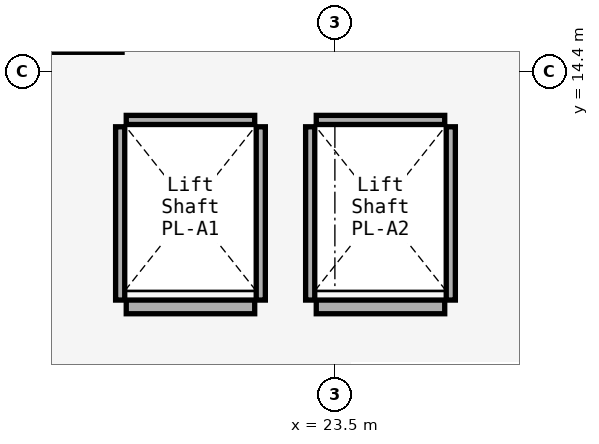
"""IFC4 building model, lengths in metres.
Left out: names, types, materials, properties, quantities, classifications, styles, units other than length and angle.
Written with IfcOpenShell. Run it as: python <this file> out.ifc"""

import sys

from ifc_helpers import new_model, si_unit, direction, frame, frame_2d, origin, place, context, subcontext, project, spatial, rectangle, extrude, element, save


model = new_model("IFC4")
c1 = context("Model", 3, precision=1e-05, world=origin(), true_north=direction((0.0, 1.0)))
c2 = subcontext(c1, "Body", "Model", "MODEL_VIEW")
j1 = project(units=[si_unit("LENGTHUNIT", "METRE"), si_unit("PLANEANGLEUNIT", "RADIAN")], contexts=[c1])
p1 = place(None, origin())
s1 = spatial("IfcSite", under=j1, at=p1, CompositionType="ELEMENT")
p2 = place(p1, origin())
s2 = spatial("IfcBuilding", under=s1, at=p2, CompositionType="ELEMENT")
p3 = place(p2, frame((0.0, 0.0, 24.0)))
s3 = spatial("IfcBuildingStorey", under=s2, at=p3, CompositionType="ELEMENT", Elevation=24.0)
p4 = place(p3, frame((20.755, 11.3, 0.0), z_axis=(0.0, 0.0, 1.0), x_axis=(1.0, 0.0, 0.0)))
e1 = element("IfcWall", 1, at=p4, inside=s3, PredefinedType="SOLIDWALL", context=c2, shape_type="SweptSolid", body=[
    extrude(rectangle(XDim=1.69, YDim=0.18, at=frame_2d((0.845, 0.0))), origin(), (0.0, 0.0, 1.0), 4.17),
])
p5 = place(p3, frame((20.755, 13.76, 0.0), z_axis=(0.0, 0.0, 1.0), x_axis=(1.0, 0.0, 0.0)))
e2 = element("IfcWall", 2, at=p5, inside=s3, PredefinedType="SOLIDWALL", context=c2, shape_type="SweptSolid", body=[
    extrude(rectangle(XDim=1.69, YDim=0.12, at=frame_2d((0.845, 0.0))), origin(), (0.0, 0.0, 1.0), 4.17),
])
for number, where, z_axis, x_axis in (
    (3, (20.675, 11.39, 0.0), (0.0, 0.0, 1.0), (0.0, 1.0, 0.0)),
    (4, (22.525, 11.39, 0.0), (0.0, 0.0, 1.0), (0.0, 1.0, 0.0)),
):
    element("IfcWall", number, at=place(p3, frame(where, z_axis=z_axis, x_axis=x_axis)), inside=s3, PredefinedType="SOLIDWALL", context=c2, shape_type="SweptSolid", body=[
        extrude(rectangle(XDim=2.28, YDim=0.12, at=frame_2d((1.14, 0.0))), origin(), (0.0, 0.0, 1.0), 4.17),
    ])
p6 = place(p3, frame((23.255, 11.3, 0.0), z_axis=(0.0, 0.0, 1.0), x_axis=(1.0, 0.0, 0.0)))
e5 = element("IfcWall", 5, at=p6, inside=s3, PredefinedType="SOLIDWALL", context=c2, shape_type="SweptSolid", body=[
    extrude(rectangle(XDim=1.69, YDim=0.18, at=frame_2d((0.845, 0.0))), origin(), (0.0, 0.0, 1.0), 4.17),
])
p7 = place(p3, frame((23.255, 13.76, 0.0), z_axis=(0.0, 0.0, 1.0), x_axis=(1.0, 0.0, 0.0)))
e6 = element("IfcWall", 6, at=p7, inside=s3, PredefinedType="SOLIDWALL", context=c2, shape_type="SweptSolid", body=[
    extrude(rectangle(XDim=1.69, YDim=0.12, at=frame_2d((0.845, 0.0))), origin(), (0.0, 0.0, 1.0), 4.17),
])
for number, where, z_axis, x_axis in (
    (7, (23.175, 11.39, 0.0), (0.0, 0.0, 1.0), (0.0, 1.0, 0.0)),
    (8, (25.025, 11.39, 0.0), (0.0, 0.0, 1.0), (0.0, 1.0, 0.0)),
):
    element("IfcWall", number, at=place(p3, frame(where, z_axis=z_axis, x_axis=x_axis)), inside=s3, PredefinedType="SOLIDWALL", context=c2, shape_type="SweptSolid", body=[
        extrude(rectangle(XDim=2.28, YDim=0.12, at=frame_2d((1.14, 0.0))), origin(), (0.0, 0.0, 1.0), 4.17),
    ])
save(model, sys.argv[1])
